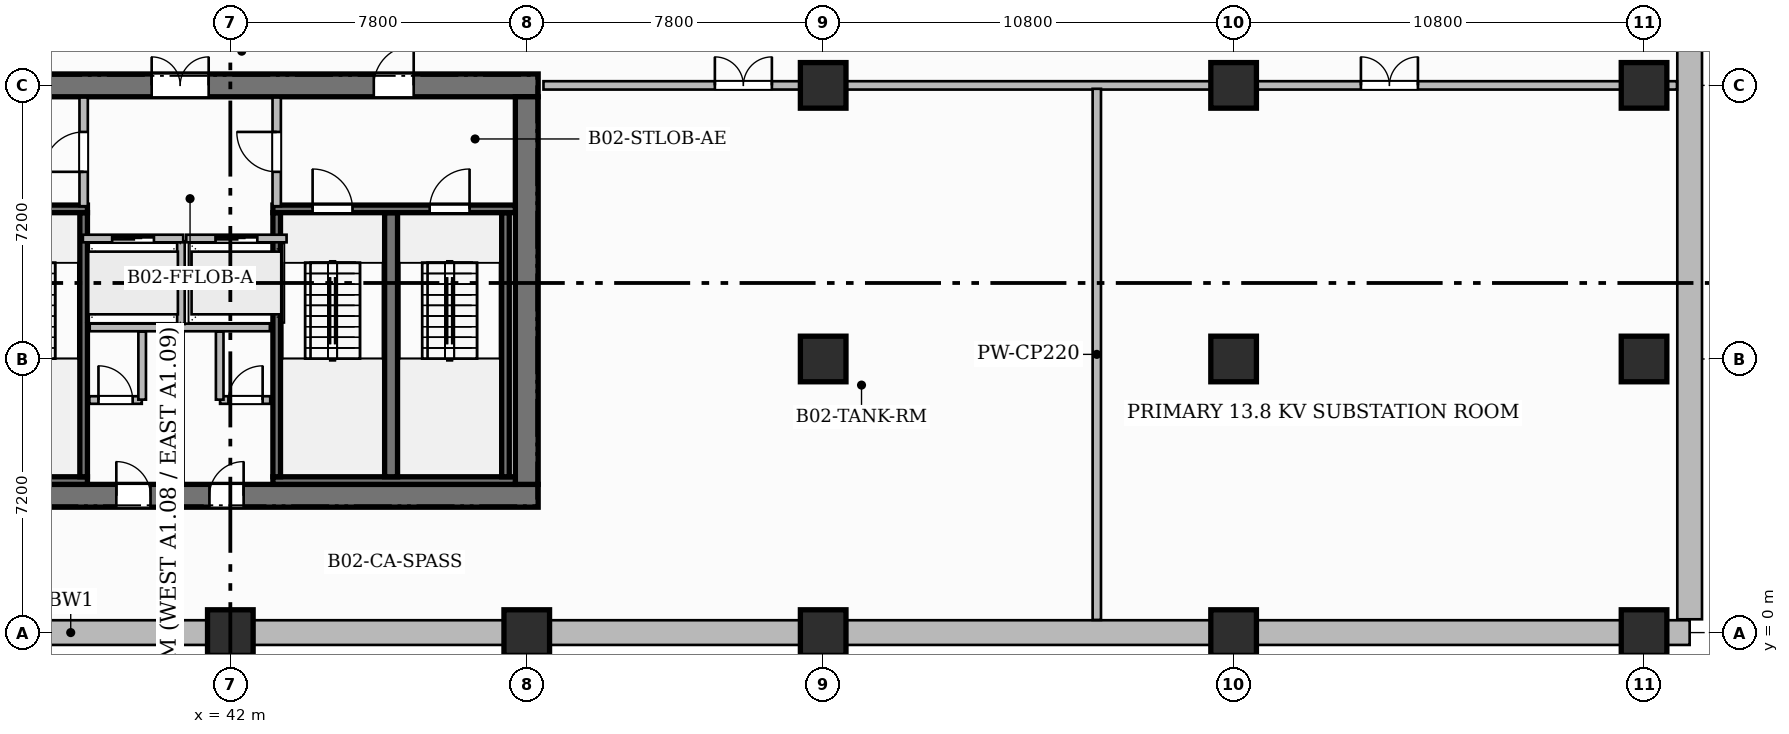
"""IFC4 building model, lengths in metres.
Left out: names, types, materials, properties, quantities, classifications, styles, units other than length and angle.
Written with IfcOpenShell. Run it as: python <this file> out.ifc"""

import sys

from ifc_helpers import new_model, si_unit, direction, frame, frame_2d, origin, origin_2d, place, context, subcontext, project, spatial, rectangle, extrude, source, transform, mapped, element, fill, save


model = new_model("IFC4")
c1 = context("Model", 3, precision=1e-05, world=origin(), true_north=direction((0.0, 1.0)))
c2 = subcontext(c1, "Body", "Model", "MODEL_VIEW")
j1 = project(units=[si_unit("LENGTHUNIT", "METRE"), si_unit("PLANEANGLEUNIT", "RADIAN")], contexts=[c1])
p1 = place(None, origin())
s1 = spatial("IfcSite", under=j1, at=p1, CompositionType="ELEMENT")
p2 = place(p1, origin())
s2 = spatial("IfcBuilding", under=s1, at=p2, CompositionType="ELEMENT")
p3 = place(p2, frame((0.0, 0.0, -13.0)))
s3 = spatial("IfcBuildingStorey", under=s2, at=p3, CompositionType="ELEMENT", Elevation=-13.0)
p4 = place(p3, frame((-4.8, 0.0, -0.4), z_axis=(0.0, 0.0, 1.0), x_axis=(1.0, 0.0, 0.0)))
e1 = element("IfcWall", 1, at=p4, inside=s3, PredefinedType="USERDEFINED", context=c2, shape_type="SweptSolid", body=[
    extrude(rectangle(XDim=85.2, YDim=0.65, at=frame_2d((42.6, 0.0))), origin(), (0.0, 0.0, 1.0), 6.9),
])
p5 = place(p3, frame((80.4, 0.35, -0.4), z_axis=(0.0, 0.0, 1.0), x_axis=(0.0, 1.0, 0.0)))
e2 = element("IfcWall", 2, at=p5, inside=s3, PredefinedType="USERDEFINED", context=c2, shape_type="SweptSolid", body=[
    extrude(rectangle(XDim=46.1, YDim=0.65, at=frame_2d((23.05, 0.0))), origin(), (0.0, 0.0, 1.0), 6.9),
])
p6 = place(p3, frame((34.5, 3.6, -0.4), z_axis=(0.0, 0.0, 1.0), x_axis=(1.0, 0.0, 0.0)))
e3 = element("IfcWall", 3, at=p6, inside=s3, PredefinedType="SHEAR", context=c2, shape_type="SweptSolid", body=[
    extrude(rectangle(XDim=15.6, YDim=0.6, at=frame_2d((7.8, 0.0))), origin(), (0.0, 0.0, 1.0), 6.9),
])
p7 = place(p6, frame((4.5, 0.0, 0.4)))
e4 = element("IfcOpeningElement", 4, at=p7, cuts=e3, PredefinedType="OPENING", context=c2, shape_type="SweptSolid", body=[
    extrude(rectangle(XDim=0.9, YDim=2.1, at=frame_2d((0.45, 1.05))), frame((0.0, 0.31, 0.0), z_axis=(0.0, -1.0, 0.0), x_axis=(1.0, 0.0, 0.0)), (0.0, 0.0, 1.0), 0.62),
])
p8 = place(p6, frame((6.95, 0.0, 0.4)))
e5 = element("IfcOpeningElement", 5, at=p8, cuts=e3, PredefinedType="OPENING", context=c2, shape_type="SweptSolid", body=[
    extrude(rectangle(XDim=0.9, YDim=2.1, at=frame_2d((0.45, 1.05))), frame((0.0, 0.31, 0.0), z_axis=(0.0, -1.0, 0.0), x_axis=(1.0, 0.0, 0.0)), (0.0, 0.0, 1.0), 0.62),
])
p9 = place(p3, frame((34.5, 14.4, -0.4), z_axis=(0.0, 0.0, 1.0), x_axis=(1.0, 0.0, 0.0)))
e6 = element("IfcWall", 6, at=p9, inside=s3, PredefinedType="SHEAR", context=c2, shape_type="SweptSolid", body=[
    extrude(rectangle(XDim=15.6, YDim=0.6, at=frame_2d((7.8, 0.0))), origin(), (0.0, 0.0, 1.0), 6.9),
])
p10 = place(p9, frame((5.43, 0.0, 0.4)))
e7 = element("IfcOpeningElement", 7, at=p10, cuts=e6, PredefinedType="OPENING", context=c2, shape_type="SweptSolid", body=[
    extrude(rectangle(XDim=1.5, YDim=2.2, at=frame_2d((0.75, 1.1))), frame((0.0, 0.31, 0.0), z_axis=(0.0, -1.0, 0.0), x_axis=(1.0, 0.0, 0.0)), (0.0, 0.0, 1.0), 0.62),
])
p11 = place(p9, frame((1.645, 0.0, 0.4)))
e8 = element("IfcOpeningElement", 8, at=p11, cuts=e6, PredefinedType="OPENING", context=c2, shape_type="SweptSolid", body=[
    extrude(rectangle(XDim=1.05, YDim=2.15, at=frame_2d((0.525, 1.075))), frame((0.0, 0.31, 0.0), z_axis=(0.0, -1.0, 0.0), x_axis=(1.0, 0.0, 0.0)), (0.0, 0.0, 1.0), 0.62),
])
p12 = place(p9, frame((11.275, 0.0, 0.4)))
e9 = element("IfcOpeningElement", 9, at=p12, cuts=e6, PredefinedType="OPENING", context=c2, shape_type="SweptSolid", body=[
    extrude(rectangle(XDim=1.05, YDim=2.15, at=frame_2d((0.525, 1.075))), frame((0.0, 0.31, 0.0), z_axis=(0.0, -1.0, 0.0), x_axis=(1.0, 0.0, 0.0)), (0.0, 0.0, 1.0), 0.62),
])
p13 = place(p3, frame((49.8, 3.9, -0.4), z_axis=(0.0, 0.0, 1.0), x_axis=(0.0, 1.0, 0.0)))
e10 = element("IfcWall", 10, at=p13, inside=s3, PredefinedType="SHEAR", context=c2, shape_type="SweptSolid", body=[
    extrude(rectangle(XDim=10.2, YDim=0.6, at=frame_2d((5.1, 0.0))), origin(), (0.0, 0.0, 1.0), 6.9),
])
m1 = source(origin(), c2, "Body", "SweptSolid", [
    extrude(rectangle(XDim=1.2, YDim=1.2, at=origin_2d()), origin(), (0.0, 0.0, 1.0), 6.9),
])
for number, where, z_axis, x_axis in (
    (11, (42.0, 0.0, -0.4), (0.0, 0.0, 1.0), (1.0, 0.0, 0.0)),
    (12, (49.8, 0.0, -0.4), (0.0, 0.0, 1.0), (1.0, 0.0, 0.0)),
    (13, (57.6, 0.0, -0.4), (0.0, 0.0, 1.0), (1.0, 0.0, 0.0)),
    (14, (57.6, 7.2, -0.4), (0.0, 0.0, 1.0), (1.0, 0.0, 0.0)),
    (15, (57.6, 14.4, -0.4), (0.0, 0.0, 1.0), (1.0, 0.0, 0.0)),
    (16, (68.4, 0.0, -0.4), (0.0, 0.0, 1.0), (1.0, 0.0, 0.0)),
    (17, (68.4, 7.2, -0.4), (0.0, 0.0, 1.0), (1.0, 0.0, 0.0)),
    (18, (68.4, 14.4, -0.4), (0.0, 0.0, 1.0), (1.0, 0.0, 0.0)),
    (19, (79.2, 0.0, -0.4), (0.0, 0.0, 1.0), (1.0, 0.0, 0.0)),
    (20, (79.2, 7.2, -0.4), (0.0, 0.0, 1.0), (1.0, 0.0, 0.0)),
    (21, (79.2, 14.4, -0.4), (0.0, 0.0, 1.0), (1.0, 0.0, 0.0)),
):
    element("IfcColumn", number, at=place(p3, frame(where, z_axis=z_axis, x_axis=x_axis)), inside=s3, PredefinedType="COLUMN", context=c2, shape_type="MappedRepresentation", body=[
        mapped(m1, transform((0.0, 0.0, 0.0), scale=1.0)),
    ])
p14 = place(p3, frame((35.1, 4.0, -0.4), z_axis=(0.0, 0.0, 1.0), x_axis=(1.0, 0.0, 0.0)))
e22 = element("IfcWall", 22, at=p14, inside=s3, PredefinedType="SHEAR", context=c2, shape_type="SweptSolid", body=[
    extrude(rectangle(XDim=3.14, YDim=0.2, at=frame_2d((1.57, 0.0))), origin(), (0.0, 0.0, 1.0), 6.9),
])
p15 = place(p3, frame((38.14, 4.1, -0.4), z_axis=(0.0, 0.0, 1.0), x_axis=(0.0, 1.0, 0.0)))
e23 = element("IfcWall", 23, at=p15, inside=s3, PredefinedType="SHEAR", context=c2, shape_type="SweptSolid", body=[
    extrude(rectangle(XDim=6.95, YDim=0.2, at=frame_2d((3.475, 0.0))), origin(), (0.0, 0.0, 1.0), 6.9),
])
p16 = place(p3, frame((35.1, 11.15, -0.4), z_axis=(0.0, 0.0, 1.0), x_axis=(1.0, 0.0, 0.0)))
e24 = element("IfcWall", 24, at=p16, inside=s3, PredefinedType="SHEAR", context=c2, shape_type="SweptSolid", body=[
    extrude(rectangle(XDim=3.14, YDim=0.2, at=frame_2d((1.57, 0.0))), origin(), (0.0, 0.0, 1.0), 6.9),
])
p17 = place(p16, frame((1.045, 0.0, 0.4)))
e25 = element("IfcOpeningElement", 25, at=p17, cuts=e24, PredefinedType="OPENING", context=c2, shape_type="SweptSolid", body=[
    extrude(rectangle(XDim=1.05, YDim=2.2, at=frame_2d((0.525, 1.1))), frame((0.0, 0.11, 0.0), z_axis=(0.0, -1.0, 0.0), x_axis=(1.0, 0.0, 0.0)), (0.0, 0.0, 1.0), 0.22),
])
p18 = place(p3, frame((43.12, 4.0, -0.4), z_axis=(0.0, 0.0, 1.0), x_axis=(1.0, 0.0, 0.0)))
e26 = element("IfcWall", 26, at=p18, inside=s3, PredefinedType="SHEAR", context=c2, shape_type="SweptSolid", body=[
    extrude(rectangle(XDim=6.38, YDim=0.2, at=frame_2d((3.19, 0.0))), origin(), (0.0, 0.0, 1.0), 6.9),
])
p19 = place(p3, frame((43.22, 4.1, -0.4), z_axis=(0.0, 0.0, 1.0), x_axis=(0.0, 1.0, 0.0)))
e27 = element("IfcWall", 27, at=p19, inside=s3, PredefinedType="SHEAR", context=c2, shape_type="SweptSolid", body=[
    extrude(rectangle(XDim=6.95, YDim=0.2, at=frame_2d((3.475, 0.0))), origin(), (0.0, 0.0, 1.0), 6.9),
])
p20 = place(p3, frame((46.23, 4.1, -0.4), z_axis=(0.0, 0.0, 1.0), x_axis=(0.0, 1.0, 0.0)))
e28 = element("IfcWall", 28, at=p20, inside=s3, PredefinedType="SHEAR", context=c2, shape_type="SweptSolid", body=[
    extrude(rectangle(XDim=6.95, YDim=0.34, at=frame_2d((3.475, 0.0))), origin(), (0.0, 0.0, 1.0), 6.9),
])
p21 = place(p3, frame((49.24, 4.1, -0.4), z_axis=(0.0, 0.0, 1.0), x_axis=(0.0, 1.0, 0.0)))
e29 = element("IfcWall", 29, at=p21, inside=s3, PredefinedType="SHEAR", context=c2, shape_type="SweptSolid", body=[
    extrude(rectangle(XDim=6.95, YDim=0.2, at=frame_2d((3.475, 0.0))), origin(), (0.0, 0.0, 1.0), 6.9),
])
p22 = place(p3, frame((43.12, 11.15, -0.4), z_axis=(0.0, 0.0, 1.0), x_axis=(1.0, 0.0, 0.0)))
e30 = element("IfcWall", 30, at=p22, inside=s3, PredefinedType="SHEAR", context=c2, shape_type="SweptSolid", body=[
    extrude(rectangle(XDim=6.38, YDim=0.2, at=frame_2d((3.19, 0.0))), origin(), (0.0, 0.0, 1.0), 6.9),
])
p23 = place(p22, frame((1.045, 0.0, 0.4)))
e31 = element("IfcOpeningElement", 31, at=p23, cuts=e30, PredefinedType="OPENING", context=c2, shape_type="SweptSolid", body=[
    extrude(rectangle(XDim=1.05, YDim=2.2, at=frame_2d((0.525, 1.1))), frame((0.0, 0.11, 0.0), z_axis=(0.0, -1.0, 0.0), x_axis=(1.0, 0.0, 0.0)), (0.0, 0.0, 1.0), 0.22),
])
p24 = place(p22, frame((4.125, 0.0, 0.4)))
e32 = element("IfcOpeningElement", 32, at=p24, cuts=e30, PredefinedType="OPENING", context=c2, shape_type="SweptSolid", body=[
    extrude(rectangle(XDim=1.05, YDim=2.2, at=frame_2d((0.525, 1.1))), frame((0.0, 0.11, 0.0), z_axis=(0.0, -1.0, 0.0), x_axis=(1.0, 0.0, 0.0)), (0.0, 0.0, 1.0), 0.22),
])
p25 = place(p3, frame((38.3, 8.03, 0.0), z_axis=(0.0, 0.0, 1.0), x_axis=(1.0, 0.0, 0.0)))
e33 = element("IfcWall", 33, at=p25, inside=s3, PredefinedType="PARTITIONING", context=c2, shape_type="SweptSolid", body=[
    extrude(rectangle(XDim=4.74, YDim=0.2, at=frame_2d((2.37, 0.0))), origin(), (0.0, 0.0, 1.0), 6.1),
])
p26 = place(p3, frame((40.7, 8.12, 0.0), z_axis=(0.0, 0.0, 1.0), x_axis=(0.0, 1.0, 0.0)))
e34 = element("IfcWall", 34, at=p26, inside=s3, PredefinedType="PARTITIONING", context=c2, shape_type="SweptSolid", body=[
    extrude(rectangle(XDim=2.18, YDim=0.2, at=frame_2d((1.09, 0.0))), origin(), (0.0, 0.0, 1.0), 6.1),
])
p27 = place(p3, frame((38.14, 11.22, 0.0), z_axis=(0.0, 0.0, 1.0), x_axis=(0.0, 1.0, 0.0)))
e35 = element("IfcWall", 35, at=p27, inside=s3, PredefinedType="PARTITIONING", context=c2, shape_type="SweptSolid", body=[
    extrude(rectangle(XDim=2.86, YDim=0.22, at=frame_2d((1.43, 0.0))), origin(), (0.0, 0.0, 1.0), 6.1),
])
p28 = place(p27, frame((0.905, 0.0, 0.0)))
e36 = element("IfcOpeningElement", 36, at=p28, cuts=e35, PredefinedType="OPENING", context=c2, shape_type="SweptSolid", body=[
    extrude(rectangle(XDim=1.05, YDim=2.15, at=frame_2d((0.525, 1.075))), frame((0.0, 0.12, 0.0), z_axis=(0.0, -1.0, 0.0), x_axis=(1.0, 0.0, 0.0)), (0.0, 0.0, 1.0), 0.24),
])
p29 = place(p3, frame((43.22, 11.22, 0.0), z_axis=(0.0, 0.0, 1.0), x_axis=(0.0, 1.0, 0.0)))
e37 = element("IfcWall", 37, at=p29, inside=s3, PredefinedType="PARTITIONING", context=c2, shape_type="SweptSolid", body=[
    extrude(rectangle(XDim=2.86, YDim=0.22, at=frame_2d((1.43, 0.0))), origin(), (0.0, 0.0, 1.0), 6.1),
])
p30 = place(p29, frame((0.905, 0.0, 0.0)))
e38 = element("IfcOpeningElement", 38, at=p30, cuts=e37, PredefinedType="OPENING", context=c2, shape_type="SweptSolid", body=[
    extrude(rectangle(XDim=1.05, YDim=2.15, at=frame_2d((0.525, 1.075))), frame((0.0, 0.12, 0.0), z_axis=(0.0, -1.0, 0.0), x_axis=(1.0, 0.0, 0.0)), (0.0, 0.0, 1.0), 0.24),
])
p31 = place(p3, frame((38.29, 6.12, 0.0), z_axis=(0.0, 0.0, 1.0), x_axis=(1.0, 0.0, 0.0)))
e39 = element("IfcWall", 39, at=p31, inside=s3, PredefinedType="PARTITIONING", context=c2, shape_type="SweptSolid", body=[
    extrude(rectangle(XDim=1.38, YDim=0.2, at=frame_2d((0.69, 0.0))), origin(), (0.0, 0.0, 1.0), 6.1),
])
p32 = place(p31, frame((0.24, 0.0, 0.0)))
e40 = element("IfcOpeningElement", 40, at=p32, cuts=e39, PredefinedType="OPENING", context=c2, shape_type="SweptSolid", body=[
    extrude(rectangle(XDim=0.9, YDim=2.1, at=frame_2d((0.45, 1.05))), frame((0.0, 0.11, 0.0), z_axis=(0.0, -1.0, 0.0), x_axis=(1.0, 0.0, 0.0)), (0.0, 0.0, 1.0), 0.22),
])
p33 = place(p3, frame((39.68, 6.13, 0.0), z_axis=(0.0, 0.0, 1.0), x_axis=(0.0, 1.0, 0.0)))
e41 = element("IfcWall", 41, at=p33, inside=s3, PredefinedType="PARTITIONING", context=c2, shape_type="SweptSolid", body=[
    extrude(rectangle(XDim=1.79, YDim=0.2, at=frame_2d((0.895, 0.0))), origin(), (0.0, 0.0, 1.0), 6.1),
])
p34 = place(p3, frame((41.73, 6.12, 0.0), z_axis=(0.0, 0.0, 1.0), x_axis=(1.0, 0.0, 0.0)))
e42 = element("IfcWall", 42, at=p34, inside=s3, PredefinedType="PARTITIONING", context=c2, shape_type="SweptSolid", body=[
    extrude(rectangle(XDim=1.32, YDim=0.2, at=frame_2d((0.66, 0.0))), origin(), (0.0, 0.0, 1.0), 6.1),
])
p35 = place(p34, frame((0.22, 0.0, 0.0)))
e43 = element("IfcOpeningElement", 43, at=p35, cuts=e42, PredefinedType="OPENING", context=c2, shape_type="SweptSolid", body=[
    extrude(rectangle(XDim=0.9, YDim=2.1, at=frame_2d((0.45, 1.05))), frame((0.0, 0.11, 0.0), z_axis=(0.0, -1.0, 0.0), x_axis=(1.0, 0.0, 0.0)), (0.0, 0.0, 1.0), 0.22),
])
p36 = place(p3, frame((41.72, 6.13, 0.0), z_axis=(0.0, 0.0, 1.0), x_axis=(0.0, 1.0, 0.0)))
e44 = element("IfcWall", 44, at=p36, inside=s3, PredefinedType="PARTITIONING", context=c2, shape_type="SweptSolid", body=[
    extrude(rectangle(XDim=1.79, YDim=0.2, at=frame_2d((0.895, 0.0))), origin(), (0.0, 0.0, 1.0), 6.1),
])
p37 = place(p3, frame((40.7, 3.92, 0.0), z_axis=(0.0, 0.0, 1.0), x_axis=(0.0, 1.0, 0.0)))
e45 = element("IfcWall", 45, at=p37, inside=s3, PredefinedType="PARTITIONING", context=c2, shape_type="SweptSolid", body=[
    extrude(rectangle(XDim=3.99, YDim=0.14, at=frame_2d((1.995, 0.0))), origin(), (0.0, 0.0, 1.0), 6.1),
])
p38 = place(p3, frame((50.24, 14.4, 0.0), z_axis=(0.0, 0.0, 1.0), x_axis=(1.0, 0.0, 0.0)))
e46 = element("IfcWall", 46, at=p38, inside=s3, PredefinedType="PARTITIONING", context=c2, shape_type="SweptSolid", body=[
    extrude(rectangle(XDim=29.827, YDim=0.22, at=frame_2d((14.914, 0.0))), origin(), (0.0, 0.0, 1.0), 5.185),
])
p39 = place(p38, frame((4.51, 0.0, 0.0)))
e47 = element("IfcOpeningElement", 47, at=p39, cuts=e46, PredefinedType="OPENING", context=c2, shape_type="SweptSolid", body=[
    extrude(rectangle(XDim=1.5, YDim=2.2, at=frame_2d((0.75, 1.1))), frame((0.0, 0.12, 0.0), z_axis=(0.0, -1.0, 0.0), x_axis=(1.0, 0.0, 0.0)), (0.0, 0.0, 1.0), 0.24),
])
p40 = place(p38, frame((21.51, 0.0, 0.0)))
e48 = element("IfcOpeningElement", 48, at=p40, cuts=e46, PredefinedType="OPENING", context=c2, shape_type="SweptSolid", body=[
    extrude(rectangle(XDim=1.5, YDim=2.2, at=frame_2d((0.75, 1.1))), frame((0.0, 0.12, 0.0), z_axis=(0.0, -1.0, 0.0), x_axis=(1.0, 0.0, 0.0)), (0.0, 0.0, 1.0), 0.24),
])
p41 = place(p3, frame((64.8, 0.333, 0.0), z_axis=(0.0, 0.0, 1.0), x_axis=(0.0, 1.0, 0.0)))
e49 = element("IfcWall", 49, at=p41, inside=s3, PredefinedType="PARTITIONING", context=c2, shape_type="SweptSolid", body=[
    extrude(rectangle(XDim=13.977, YDim=0.22, at=frame_2d((6.989, 0.0))), origin(), (0.0, 0.0, 1.0), 6.1),
])
p42 = place(p3, frame((38.12, 10.37, 0.0), z_axis=(0.0, 0.0, 1.0), x_axis=(1.0, 0.0, 0.0)))
e50 = element("IfcWall", 50, at=p42, inside=s3, PredefinedType="PARTITIONING", context=c2, shape_type="SweptSolid", body=[
    extrude(rectangle(XDim=2.64, YDim=0.2, at=frame_2d((1.32, 0.0))), origin(), (0.0, 0.0, 1.0), 6.1),
])
p43 = place(p42, frame((0.77, 0.0, 0.0)))
e51 = element("IfcOpeningElement", 51, at=p43, cuts=e50, PredefinedType="OPENING", context=c2, shape_type="SweptSolid", body=[
    extrude(rectangle(XDim=1.1, YDim=2.2, at=frame_2d((0.55, 1.1))), frame((0.0, 0.11, 0.0), z_axis=(0.0, -1.0, 0.0), x_axis=(1.0, 0.0, 0.0)), (0.0, 0.0, 1.0), 0.22),
])
p44 = place(p3, frame((40.84, 10.37, 0.0), z_axis=(0.0, 0.0, 1.0), x_axis=(1.0, 0.0, 0.0)))
e52 = element("IfcWall", 52, at=p44, inside=s3, PredefinedType="PARTITIONING", context=c2, shape_type="SweptSolid", body=[
    extrude(rectangle(XDim=2.64, YDim=0.2, at=frame_2d((1.32, 0.0))), origin(), (0.0, 0.0, 1.0), 6.1),
])
p45 = place(p44, frame((0.77, 0.0, 0.0)))
e53 = element("IfcOpeningElement", 53, at=p45, cuts=e52, PredefinedType="OPENING", context=c2, shape_type="SweptSolid", body=[
    extrude(rectangle(XDim=1.1, YDim=2.2, at=frame_2d((0.55, 1.1))), frame((0.0, 0.11, 0.0), z_axis=(0.0, -1.0, 0.0), x_axis=(1.0, 0.0, 0.0)), (0.0, 0.0, 1.0), 0.22),
])
m2 = source(origin(), c2, "Body", "SweptSolid", [
    extrude(rectangle(XDim=1.05, YDim=2.2, at=frame_2d((0.525, 1.1))), frame((0.0, 0.025, 0.0), z_axis=(0.0, -1.0, 0.0), x_axis=(1.0, 0.0, 0.0)), (0.0, 0.0, 1.0), 0.05),
])
p46 = place(p23, origin())
e54 = element("IfcDoor", 54, at=p46, inside=s3, OperationType="SINGLE_SWING_LEFT", PredefinedType="DOOR", context=c2, shape_type="MappedRepresentation", body=[
    mapped(m2, transform((0.0, 0.0, 0.0), scale=1.0)),
])
fill(e31, e54)
p47 = place(p24, origin())
e55 = element("IfcDoor", 55, at=p47, inside=s3, OperationType="SINGLE_SWING_RIGHT", PredefinedType="DOOR", context=c2, shape_type="MappedRepresentation", body=[
    mapped(m2, transform((0.0, 0.0, 0.0), scale=1.0)),
])
fill(e32, e55)
m3 = source(origin(), c2, "Body", "SweptSolid", [
    extrude(rectangle(XDim=1.05, YDim=2.15, at=frame_2d((0.525, 1.075))), frame((0.0, 0.025, 0.0), z_axis=(0.0, -1.0, 0.0), x_axis=(1.0, 0.0, 0.0)), (0.0, 0.0, 1.0), 0.05),
])
p48 = place(p28, origin())
e56 = element("IfcDoor", 56, at=p48, inside=s3, OperationType="SINGLE_SWING_LEFT", PredefinedType="DOOR", context=c2, shape_type="MappedRepresentation", body=[
    mapped(m3, transform((0.0, 0.0, 0.0), scale=1.0)),
])
fill(e36, e56)
p49 = place(p30, origin())
e57 = element("IfcDoor", 57, at=p49, inside=s3, OperationType="SINGLE_SWING_RIGHT", PredefinedType="DOOR", context=c2, shape_type="MappedRepresentation", body=[
    mapped(m3, transform((0.0, 0.0, 0.0), scale=1.0)),
])
fill(e38, e57)
m4 = source(origin(), c2, "Body", "SweptSolid", [
    extrude(rectangle(XDim=1.5, YDim=2.2, at=frame_2d((0.75, 1.1))), frame((0.0, 0.025, 0.0), z_axis=(0.0, -1.0, 0.0), x_axis=(1.0, 0.0, 0.0)), (0.0, 0.0, 1.0), 0.05),
])
p50 = place(p10, origin())
e58 = element("IfcDoor", 58, at=p50, inside=s3, OperationType="DOUBLE_DOOR_SINGLE_SWING", PredefinedType="DOOR", context=c2, shape_type="MappedRepresentation", body=[
    mapped(m4, transform((0.0, 0.0, 0.0), scale=1.0)),
])
fill(e7, e58)
p51 = place(p12, origin())
e59 = element("IfcDoor", 59, at=p51, inside=s3, OperationType="SINGLE_SWING_RIGHT", PredefinedType="DOOR", context=c2, shape_type="MappedRepresentation", body=[
    mapped(m3, transform((0.0, 0.0, 0.0), scale=1.0)),
])
fill(e9, e59)
m5 = source(origin(), c2, "Body", "SweptSolid", [
    extrude(rectangle(XDim=0.9, YDim=2.1, at=frame_2d((0.45, 1.05))), frame((0.0, 0.025, 0.0), z_axis=(0.0, -1.0, 0.0), x_axis=(1.0, 0.0, 0.0)), (0.0, 0.0, 1.0), 0.05),
])
p52 = place(p32, origin())
e60 = element("IfcDoor", 60, at=p52, inside=s3, OperationType="SINGLE_SWING_LEFT", PredefinedType="DOOR", context=c2, shape_type="MappedRepresentation", body=[
    mapped(m5, transform((0.0, 0.0, 0.0), scale=1.0)),
])
fill(e40, e60)
p53 = place(p35, origin())
e61 = element("IfcDoor", 61, at=p53, inside=s3, OperationType="SINGLE_SWING_RIGHT", PredefinedType="DOOR", context=c2, shape_type="MappedRepresentation", body=[
    mapped(m5, transform((0.0, 0.0, 0.0), scale=1.0)),
])
fill(e43, e61)
p54 = place(p7, origin())
e62 = element("IfcDoor", 62, at=p54, inside=s3, OperationType="SINGLE_SWING_LEFT", PredefinedType="DOOR", context=c2, shape_type="MappedRepresentation", body=[
    mapped(m5, transform((0.0, 0.0, 0.0), scale=1.0)),
])
fill(e4, e62)
p55 = place(p8, origin())
e63 = element("IfcDoor", 63, at=p55, inside=s3, OperationType="SINGLE_SWING_RIGHT", PredefinedType="DOOR", context=c2, shape_type="MappedRepresentation", body=[
    mapped(m5, transform((0.0, 0.0, 0.0), scale=1.0)),
])
fill(e5, e63)
p56 = place(p39, origin())
e64 = element("IfcDoor", 64, at=p56, inside=s3, OperationType="DOUBLE_DOOR_SINGLE_SWING", PredefinedType="DOOR", context=c2, shape_type="MappedRepresentation", body=[
    mapped(m4, transform((0.0, 0.0, 0.0), scale=1.0)),
])
fill(e47, e64)
p57 = place(p40, origin())
e65 = element("IfcDoor", 65, at=p57, inside=s3, OperationType="DOUBLE_DOOR_SINGLE_SWING", PredefinedType="DOOR", context=c2, shape_type="MappedRepresentation", body=[
    mapped(m4, transform((0.0, 0.0, 0.0), scale=1.0)),
])
fill(e48, e65)
m6 = source(origin(), c2, "Body", "SweptSolid", [
    extrude(rectangle(XDim=1.1, YDim=2.2, at=frame_2d((0.55, 1.1))), frame((0.0, 0.025, 0.0), z_axis=(0.0, -1.0, 0.0), x_axis=(1.0, 0.0, 0.0)), (0.0, 0.0, 1.0), 0.05),
])
p58 = place(p43, origin())
e66 = element("IfcDoor", 66, at=p58, inside=s3, OperationType="SLIDING_TO_LEFT", PredefinedType="DOOR", context=c2, shape_type="MappedRepresentation", body=[
    mapped(m6, transform((0.0, 0.0, 0.0), scale=1.0)),
])
fill(e51, e66)
p59 = place(p45, origin())
e67 = element("IfcDoor", 67, at=p59, inside=s3, OperationType="SLIDING_TO_LEFT", PredefinedType="DOOR", context=c2, shape_type="MappedRepresentation", body=[
    mapped(m6, transform((0.0, 0.0, 0.0), scale=1.0)),
])
fill(e53, e67)
save(model, sys.argv[1])
